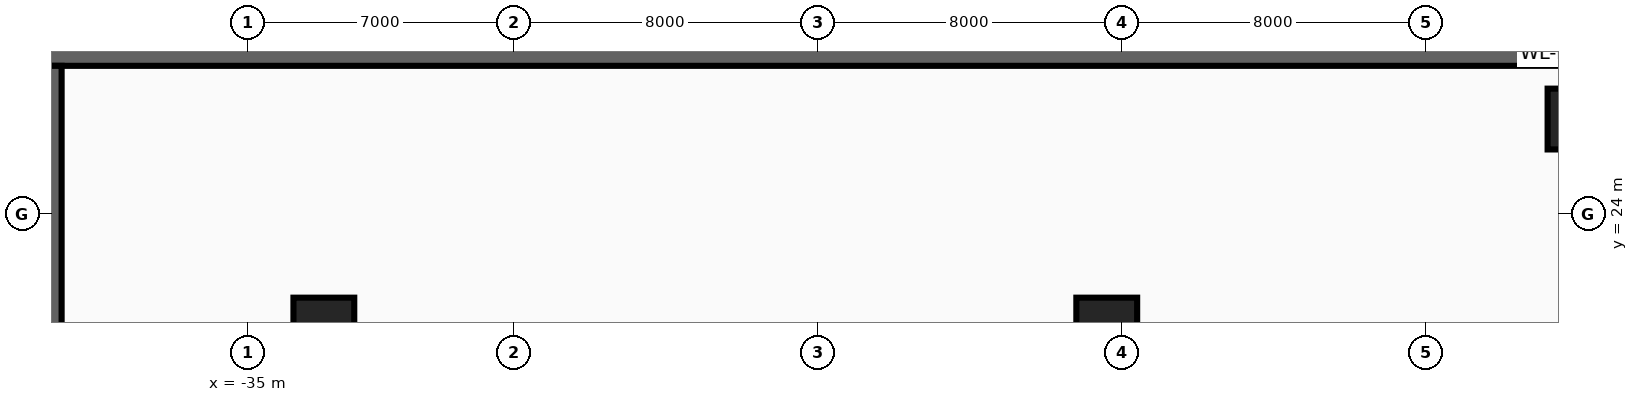
"""IFC4 building model, lengths in metres.
Left out: names, types, materials, properties, quantities, classifications, styles, units other than length and angle.
Written with IfcOpenShell. Run it as: python <this file> out.ifc"""

import sys

from ifc_helpers import new_model, si_unit, direction, frame, frame_2d, origin, origin_2d, place, context, subcontext, project, spatial, rectangle, extrude, source, transform, mapped, element, save


model = new_model("IFC4")
c1 = context("Model", 3, precision=1e-05, world=origin(), true_north=direction((0.0, 1.0)))
c2 = subcontext(c1, "Body", "Model", "MODEL_VIEW")
j1 = project(units=[si_unit("LENGTHUNIT", "METRE"), si_unit("PLANEANGLEUNIT", "RADIAN")], contexts=[c1])
p1 = place(None, origin())
s1 = spatial("IfcSite", under=j1, at=p1, CompositionType="ELEMENT")
p2 = place(p1, origin())
s2 = spatial("IfcBuilding", under=s1, at=p2, CompositionType="ELEMENT")
p3 = place(p2, frame((0.0, 0.0, -4.8)))
s3 = spatial("IfcBuildingStorey", under=s2, at=p3, CompositionType="ELEMENT", Elevation=-4.8)
p4 = place(p3, frame((-40.5, 28.2, 0.0), z_axis=(0.0, 0.0, 1.0), x_axis=(1.0, 0.0, 0.0)))
e1 = element("IfcWall", 1, at=p4, inside=s3, PredefinedType="SOLIDWALL", context=c2, shape_type="SweptSolid", body=[
    extrude(rectangle(XDim=81.0, YDim=0.6, at=frame_2d((40.5, 0.0))), origin(), (0.0, 0.0, 1.0), 4.52),
])
p5 = place(p3, frame((-40.2, -27.9, 0.0), z_axis=(0.0, 0.0, 1.0), x_axis=(0.0, 1.0, 0.0)))
e2 = element("IfcWall", 2, at=p5, inside=s3, PredefinedType="SOLIDWALL", context=c2, shape_type="SweptSolid", body=[
    extrude(rectangle(XDim=55.8, YDim=0.6, at=frame_2d((27.9, 0.0))), origin(), (0.0, 0.0, 1.0), 4.52),
])
m1 = source(origin(), c2, "Body", "SweptSolid", [
    extrude(rectangle(XDim=1.6, YDim=1.6, at=origin_2d()), origin(), (0.0, 0.0, 1.0), 4.8),
])
for number, where, z_axis, x_axis in (
    (3, (-33.0, 21.0, 0.0), (0.0, 0.0, 1.0), (1.0, 0.0, 0.0)),
    (4, (-12.4, 21.0, 0.0), (0.0, 0.0, 1.0), (1.0, 0.0, 0.0)),
    (5, (0.0, 26.5, 0.0), (0.0, 0.0, 1.0), (1.0, 0.0, 0.0)),
):
    element("IfcColumn", number, at=place(p3, frame(where, z_axis=z_axis, x_axis=x_axis)), inside=s3, PredefinedType="COLUMN", context=c2, shape_type="MappedRepresentation", body=[
        mapped(m1, transform((0.0, 0.0, 0.0), x_axis=(1.0, 0.0, 0.0), y_axis=(0.0, 1.0, 0.0), z_axis=(0.0, 0.0, 1.0), scale=1.0)),
    ])
save(model, sys.argv[1])
